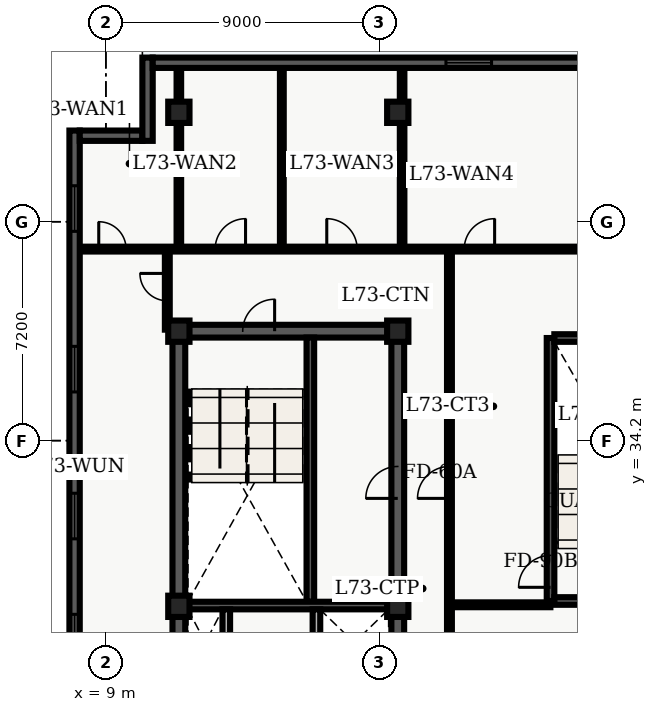
"""IFC4 building model, lengths in metres.
Left out: names, types, materials, properties, quantities, classifications, styles, units other than length and angle.
Written with IfcOpenShell. Run it as: python <this file> out.ifc"""

import sys

from ifc_helpers import new_model, entity, si_unit, converted_unit, direction, frame, origin_with_axes, origin_2d_with_axis, place, context, subcontext, project, spatial, polyline, rectangle, outline, extrude, element, fill, save


model = new_model("IFC4")
c1 = context("Model", 3, precision=1e-05, world=origin_with_axes(), true_north=direction((0.0, 1.0)))
c2 = subcontext(c1, "Body", "Model", "MODEL_VIEW")
j1 = project(units=[si_unit("LENGTHUNIT", "METRE"), converted_unit("PLANEANGLEUNIT", "DEGREE", entity("IfcPlaneAngleMeasure", 0.017), si_unit("PLANEANGLEUNIT", "RADIAN"), dimensions=[0, 0, 0, 0, 0, 0, 0])], contexts=[c1])
p1 = place(None, origin_with_axes())
s1 = spatial("IfcSite", under=j1, at=p1, CompositionType="ELEMENT")
p2 = place(p1, origin_with_axes())
s2 = spatial("IfcBuilding", under=s1, at=p2, CompositionType="ELEMENT")
p3 = place(p2, frame((0.0, 0.0, 295.8), z_axis=(0.0, 0.0, 1.0), x_axis=(1.0, 0.0, 0.0)))
s3 = spatial("IfcBuildingStorey", under=s2, at=p3, CompositionType="ELEMENT", Elevation=295.8)
p4 = place(p3, frame((11.4, 10.8, 0.0), z_axis=(0.0, 0.0, 1.0), x_axis=(0.0, 1.0, 0.0)))
e1 = element("IfcWall", 1, at=p4, inside=s3, PredefinedType="SHEAR", context=c2, shape_type="SweptSolid", body=[
    extrude(outline(polyline([(0.0, -0.21), (27.0, -0.21), (27.0, 0.21), (0.0, 0.21), (0.0, -0.21)])), origin_with_axes(), (0.0, 0.0, 1.0), 3.66),
])
p5 = place(p3, frame((11.4, 37.8, 0.0), z_axis=(0.0, 0.0, 1.0), x_axis=(1.0, 0.0, 0.0)))
e2 = element("IfcWall", 2, at=p5, inside=s3, PredefinedType="SHEAR", context=c2, shape_type="SweptSolid", body=[
    extrude(outline(polyline([(0.0, -0.21), (7.2, -0.21), (7.2, 0.21), (0.0, 0.21), (0.0, -0.21)])), origin_with_axes(), (0.0, 0.0, 1.0), 3.66),
])
p6 = place(p5, frame((2.625, 0.0, 0.0), z_axis=(0.0, 0.0, 1.0), x_axis=(1.0, 0.0, 0.0)))
e3 = element("IfcOpeningElement", 3, at=p6, cuts=e2, PredefinedType="OPENING", context=c2, shape_type="SweptSolid", body=[
    extrude(rectangle(XDim=1.05, YDim=0.44, at=origin_2d_with_axis()), origin_with_axes(), (0.0, 0.0, 1.0), 2.15),
])
p7 = place(p3, frame((18.6, 24.3, 0.0), z_axis=(0.0, 0.0, 1.0), x_axis=(0.0, 1.0, 0.0)))
e4 = element("IfcWall", 4, at=p7, inside=s3, PredefinedType="SHEAR", context=c2, shape_type="SweptSolid", body=[
    extrude(outline(polyline([(0.0, -0.21), (13.5, -0.21), (13.5, 0.21), (0.0, 0.21), (0.0, -0.21)])), origin_with_axes(), (0.0, 0.0, 1.0), 3.66),
])
p8 = place(p7, frame((8.525, 0.0, 0.0), z_axis=(0.0, 0.0, 1.0), x_axis=(1.0, 0.0, 0.0)))
e5 = element("IfcOpeningElement", 5, at=p8, cuts=e4, PredefinedType="OPENING", context=c2, shape_type="SweptSolid", body=[
    extrude(rectangle(XDim=1.05, YDim=0.44, at=origin_2d_with_axis()), origin_with_axes(), (0.0, 0.0, 1.0), 2.15),
])
p9 = place(p3, frame((15.725, 28.9, 0.0), z_axis=(0.0, 0.0, 1.0), x_axis=(0.0, 1.0, 0.0)))
e6 = element("IfcWall", 6, at=p9, inside=s3, PredefinedType="SHEAR", context=c2, shape_type="SweptSolid", body=[
    extrude(outline(polyline([(0.0, -0.125), (8.69, -0.125), (8.69, 0.125), (0.0, 0.125), (0.0, -0.125)])), origin_with_axes(), (0.0, 0.0, 1.0), 3.66),
])
p10 = place(p3, frame((11.61, 28.775, 0.0), z_axis=(0.0, 0.0, 1.0), x_axis=(1.0, 0.0, 0.0)))
e7 = element("IfcWall", 7, at=p10, inside=s3, PredefinedType="SHEAR", context=c2, shape_type="SweptSolid", body=[
    extrude(outline(polyline([(0.0, -0.125), (6.78, -0.125), (6.78, 0.125), (0.0, 0.125), (0.0, -0.125)])), origin_with_axes(), (0.0, 0.0, 1.0), 3.66),
])
for number, where, z_axis, x_axis in (
    (8, (12.96, 26.45, 0.0), (0.0, 0.0, 1.0), (0.0, 1.0, 0.0)),
    (9, (15.925, 26.45, 0.0), (0.0, 0.0, 1.0), (0.0, 1.0, 0.0)),
):
    element("IfcWall", number, at=place(p3, frame(where, z_axis=z_axis, x_axis=x_axis)), inside=s3, PredefinedType="SOLIDWALL", context=c2, shape_type="SweptSolid", body=[
        extrude(outline(polyline([(0.0, -0.125), (2.2, -0.125), (2.2, 0.125), (0.0, 0.125), (0.0, -0.125)])), origin_with_axes(), (0.0, 0.0, 1.0), 2.7),
    ])
p11 = place(p3, frame((23.625, 28.925, 0.0), z_axis=(0.0, 0.0, 1.0), x_axis=(0.0, 1.0, 0.0)))
e10 = element("IfcWall", 10, at=p11, inside=s3, PredefinedType="SHEAR", context=c2, shape_type="SweptSolid", body=[
    extrude(outline(polyline([(0.0, -0.125), (8.65, -0.125), (8.65, 0.125), (0.0, 0.125), (0.0, -0.125)])), origin_with_axes(), (0.0, 0.0, 1.0), 3.66),
])
p12 = place(p11, frame((0.975, 0.0, 0.0), z_axis=(0.0, 0.0, 1.0), x_axis=(1.0, 0.0, 0.0)))
e11 = element("IfcOpeningElement", 11, at=p12, cuts=e10, PredefinedType="OPENING", context=c2, shape_type="SweptSolid", body=[
    extrude(rectangle(XDim=1.05, YDim=0.27, at=origin_2d_with_axis()), origin_with_axes(), (0.0, 0.0, 1.0), 2.15),
])
for number, where, z_axis, x_axis in (
    (12, (23.75, 28.925, 0.0), (0.0, 0.0, 1.0), (1.0, 0.0, 0.0)),
    (13, (23.75, 37.575, 0.0), (0.0, 0.0, 1.0), (1.0, 0.0, 0.0)),
):
    element("IfcWall", number, at=place(p3, frame(where, z_axis=z_axis, x_axis=x_axis)), inside=s3, PredefinedType="SHEAR", context=c2, shape_type="SweptSolid", body=[
        extrude(outline(polyline([(0.0, -0.125), (3.9, -0.125), (3.9, 0.125), (0.0, 0.125), (0.0, -0.125)])), origin_with_axes(), (0.0, 0.0, 1.0), 3.66),
    ])
for number, where, z_axis, x_axis in (
    (14, (11.4, 28.75, 0.0), (0.0, 0.0, 1.0), (1.0, 0.0, 0.0)),
    (15, (11.4, 37.8, 0.0), (0.0, 0.0, 1.0), (1.0, 0.0, 0.0)),
    (16, (11.4, 45.0, 0.0), (0.0, 0.0, 1.0), (1.0, 0.0, 0.0)),
    (17, (18.6, 28.75, 0.0), (0.0, 0.0, 1.0), (1.0, 0.0, 0.0)),
    (18, (18.6, 37.8, 0.0), (0.0, 0.0, 1.0), (1.0, 0.0, 0.0)),
    (19, (18.6, 45.0, 0.0), (0.0, 0.0, 1.0), (1.0, 0.0, 0.0)),
):
    element("IfcColumn", number, at=place(p3, frame(where, z_axis=z_axis, x_axis=x_axis)), inside=s3, PredefinedType="COLUMN", context=c2, shape_type="SweptSolid", body=[
        extrude(rectangle(XDim=0.7, YDim=0.7, at=origin_2d_with_axis()), origin_with_axes(), (0.0, 0.0, 1.0), 3.9),
    ])
p13 = place(p3, frame((8.135, 40.5, 0.0), z_axis=(0.0, 0.0, 1.0), x_axis=(1.0, 0.0, 0.0)))
e20 = element("IfcWall", 20, at=p13, inside=s3, PredefinedType="PARTITIONING", context=c2, shape_type="SweptSolid", body=[
    extrude(outline(polyline([(0.0, -0.08), (22.715, -0.08), (22.715, 0.08), (0.0, 0.08), (0.0, -0.08)])), origin_with_axes(), (0.0, 0.0, 1.0), 2.7),
])
p14 = place(p13, frame((1.08, 0.0, 0.0), z_axis=(0.0, 0.0, 1.0), x_axis=(1.0, 0.0, 0.0)))
e21 = element("IfcOpeningElement", 21, at=p14, cuts=e20, PredefinedType="OPENING", context=c2, shape_type="SweptSolid", body=[
    extrude(rectangle(XDim=0.9, YDim=0.18, at=origin_2d_with_axis()), origin_with_axes(), (0.0, 0.0, 1.0), 2.15),
])
p15 = place(p13, frame((4.958, 0.0, 0.0), z_axis=(0.0, 0.0, 1.0), x_axis=(1.0, 0.0, 0.0)))
e22 = element("IfcOpeningElement", 22, at=p15, cuts=e20, PredefinedType="OPENING", context=c2, shape_type="SweptSolid", body=[
    extrude(rectangle(XDim=1.0, YDim=0.18, at=origin_2d_with_axis()), origin_with_axes(), (0.0, 0.0, 1.0), 2.15),
])
p16 = place(p13, frame((8.63, 0.0, 0.0), z_axis=(0.0, 0.0, 1.0), x_axis=(1.0, 0.0, 0.0)))
e23 = element("IfcOpeningElement", 23, at=p16, cuts=e20, PredefinedType="OPENING", context=c2, shape_type="SweptSolid", body=[
    extrude(rectangle(XDim=1.0, YDim=0.18, at=origin_2d_with_axis()), origin_with_axes(), (0.0, 0.0, 1.0), 2.15),
])
p17 = place(p13, frame((13.151, 0.0, 0.0), z_axis=(0.0, 0.0, 1.0), x_axis=(1.0, 0.0, 0.0)))
e24 = element("IfcOpeningElement", 24, at=p17, cuts=e20, PredefinedType="OPENING", context=c2, shape_type="SweptSolid", body=[
    extrude(rectangle(XDim=1.0, YDim=0.18, at=origin_2d_with_axis()), origin_with_axes(), (0.0, 0.0, 1.0), 2.15),
])
p18 = place(p3, frame((20.3, 2.14, 0.0), z_axis=(0.0, 0.0, 1.0), x_axis=(0.0, 1.0, 0.0)))
e25 = element("IfcWall", 25, at=p18, inside=s3, PredefinedType="PARTITIONING", context=c2, shape_type="SweptSolid", body=[
    extrude(outline(polyline([(0.0, -0.08), (38.36, -0.08), (38.36, 0.08), (0.0, 0.08), (0.0, -0.08)])), origin_with_axes(), (0.0, 0.0, 1.0), 2.7),
])
p19 = place(p18, frame((30.685, 0.0, 0.0), z_axis=(0.0, 0.0, 1.0), x_axis=(1.0, 0.0, 0.0)))
e26 = element("IfcOpeningElement", 26, at=p19, cuts=e25, PredefinedType="OPENING", context=c2, shape_type="SweptSolid", body=[
    extrude(rectangle(XDim=1.05, YDim=0.18, at=origin_2d_with_axis()), origin_with_axes(), (0.0, 0.0, 1.0), 2.15),
])
p20 = place(p18, frame((3.524, 0.0, 0.0), z_axis=(0.0, 0.0, 1.0), x_axis=(1.0, 0.0, 0.0)))
e27 = element("IfcOpeningElement", 27, at=p20, cuts=e25, PredefinedType="OPENING", context=c2, shape_type="SweptSolid", body=[
    extrude(rectangle(XDim=1.0, YDim=0.18, at=origin_2d_with_axis()), origin_with_axes(), (0.0, 0.0, 1.0), 2.15),
])
p21 = place(p18, frame((12.23, 0.0, 0.0), z_axis=(0.0, 0.0, 1.0), x_axis=(1.0, 0.0, 0.0)))
e28 = element("IfcOpeningElement", 28, at=p21, cuts=e25, PredefinedType="OPENING", context=c2, shape_type="SweptSolid", body=[
    extrude(rectangle(XDim=1.0, YDim=0.18, at=origin_2d_with_axis()), origin_with_axes(), (0.0, 0.0, 1.0), 2.15),
])
p22 = place(p18, frame((19.033, 0.0, 0.0), z_axis=(0.0, 0.0, 1.0), x_axis=(1.0, 0.0, 0.0)))
e29 = element("IfcOpeningElement", 29, at=p22, cuts=e25, PredefinedType="OPENING", context=c2, shape_type="SweptSolid", body=[
    extrude(rectangle(XDim=1.0, YDim=0.18, at=origin_2d_with_axis()), origin_with_axes(), (0.0, 0.0, 1.0), 2.15),
])
p23 = place(p18, frame((23.912, 0.0, 0.0), z_axis=(0.0, 0.0, 1.0), x_axis=(1.0, 0.0, 0.0)))
e30 = element("IfcOpeningElement", 30, at=p23, cuts=e25, PredefinedType="OPENING", context=c2, shape_type="SweptSolid", body=[
    extrude(rectangle(XDim=1.0, YDim=0.18, at=origin_2d_with_axis()), origin_with_axes(), (0.0, 0.0, 1.0), 2.15),
])
p24 = place(p3, frame((20.3, 28.8, 0.0), z_axis=(0.0, 0.0, 1.0), x_axis=(1.0, 0.0, 0.0)))
e31 = element("IfcWall", 31, at=p24, inside=s3, PredefinedType="PARTITIONING", context=c2, shape_type="SweptSolid", body=[
    extrude(outline(polyline([(0.0, -0.08), (3.32, -0.08), (3.32, 0.08), (0.0, 0.08), (0.0, -0.08)])), origin_with_axes(), (0.0, 0.0, 1.0), 2.7),
])
p25 = place(p3, frame((11.02, 37.85, 0.0), z_axis=(0.0, 0.0, 1.0), x_axis=(0.0, 1.0, 0.0)))
e32 = element("IfcWall", 32, at=p25, inside=s3, PredefinedType="PARTITIONING", context=c2, shape_type="SweptSolid", body=[
    extrude(outline(polyline([(0.0, -0.08), (2.65, -0.08), (2.65, 0.08), (0.0, 0.08), (0.0, -0.08)])), origin_with_axes(), (0.0, 0.0, 1.0), 2.7),
])
p26 = place(p25, frame((1.4, 0.0, 0.0), z_axis=(0.0, 0.0, 1.0), x_axis=(1.0, 0.0, 0.0)))
e33 = element("IfcOpeningElement", 33, at=p26, cuts=e32, PredefinedType="OPENING", context=c2, shape_type="SweptSolid", body=[
    extrude(rectangle(XDim=0.9, YDim=0.18, at=origin_2d_with_axis()), origin_with_axes(), (0.0, 0.0, 1.0), 2.15),
])
p27 = place(p3, frame((11.4, 40.6, 0.0), z_axis=(0.0, 0.0, 1.0), x_axis=(0.0, 1.0, 0.0)))
e34 = element("IfcWall", 34, at=p27, inside=s3, PredefinedType="PARTITIONING", context=c2, shape_type="SweptSolid", body=[
    extrude(outline(polyline([(0.0, -0.075), (5.865, -0.075), (5.865, 0.075), (0.0, 0.075), (0.0, -0.075)])), origin_with_axes(), (0.0, 0.0, 1.0), 2.7),
])
p28 = place(p3, frame((14.787, 40.6, 0.0), z_axis=(0.0, 0.0, 1.0), x_axis=(0.0, 1.0, 0.0)))
e35 = element("IfcWall", 35, at=p28, inside=s3, PredefinedType="PARTITIONING", context=c2, shape_type="SweptSolid", body=[
    extrude(outline(polyline([(0.0, -0.062), (5.865, -0.062), (5.865, 0.062), (0.0, 0.062), (0.0, -0.062)])), origin_with_axes(), (0.0, 0.0, 1.0), 2.7),
])
p29 = place(p3, frame((18.743, 40.6, 0.0), z_axis=(0.0, 0.0, 1.0), x_axis=(0.0, 1.0, 0.0)))
e36 = element("IfcWall", 36, at=p29, inside=s3, PredefinedType="PARTITIONING", context=c2, shape_type="SweptSolid", body=[
    extrude(outline(polyline([(0.0, -0.075), (5.865, -0.075), (5.865, 0.075), (0.0, 0.075), (0.0, -0.075)])), origin_with_axes(), (0.0, 0.0, 1.0), 2.7),
])
p30 = place(p3, frame((7.97, 4.54, 0.0), z_axis=(0.0, 0.0, 1.0), x_axis=(0.0, 1.0, 0.0)))
e37 = element("IfcWall", 37, at=p30, inside=s3, PredefinedType="SOLIDWALL", context=c2, shape_type="SweptSolid", body=[
    extrude(outline(polyline([(0.0, -0.17), (39.86, -0.17), (39.86, 0.17), (0.0, 0.17), (0.0, -0.17)])), origin_with_axes(), (0.0, 0.0, 1.0), 3.66),
])
p31 = place(p30, frame((7.849, 0.0, 0.45), z_axis=(0.0, 0.0, 1.0), x_axis=(1.0, 0.0, 0.0)))
e38 = element("IfcOpeningElement", 38, at=p31, cuts=e37, PredefinedType="OPENING", context=c2, shape_type="SweptSolid", body=[
    extrude(rectangle(XDim=1.5, YDim=0.36, at=origin_2d_with_axis()), origin_with_axes(), (0.0, 0.0, 1.0), 2.1),
])
p32 = place(p30, frame((12.681, 0.0, 0.45), z_axis=(0.0, 0.0, 1.0), x_axis=(1.0, 0.0, 0.0)))
e39 = element("IfcOpeningElement", 39, at=p32, cuts=e37, PredefinedType="OPENING", context=c2, shape_type="SweptSolid", body=[
    extrude(rectangle(XDim=1.5, YDim=0.36, at=origin_2d_with_axis()), origin_with_axes(), (0.0, 0.0, 1.0), 2.1),
])
p33 = place(p30, frame((17.514, 0.0, 0.45), z_axis=(0.0, 0.0, 1.0), x_axis=(1.0, 0.0, 0.0)))
e40 = element("IfcOpeningElement", 40, at=p33, cuts=e37, PredefinedType="OPENING", context=c2, shape_type="SweptSolid", body=[
    extrude(rectangle(XDim=1.5, YDim=0.36, at=origin_2d_with_axis()), origin_with_axes(), (0.0, 0.0, 1.0), 2.1),
])
p34 = place(p30, frame((23.196, 0.0, 0.45), z_axis=(0.0, 0.0, 1.0), x_axis=(1.0, 0.0, 0.0)))
e41 = element("IfcOpeningElement", 41, at=p34, cuts=e37, PredefinedType="OPENING", context=c2, shape_type="SweptSolid", body=[
    extrude(rectangle(XDim=1.5, YDim=0.36, at=origin_2d_with_axis()), origin_with_axes(), (0.0, 0.0, 1.0), 2.1),
])
p35 = place(p30, frame((27.179, 0.0, 0.45), z_axis=(0.0, 0.0, 1.0), x_axis=(1.0, 0.0, 0.0)))
e42 = element("IfcOpeningElement", 42, at=p35, cuts=e37, PredefinedType="OPENING", context=c2, shape_type="SweptSolid", body=[
    extrude(rectangle(XDim=1.5, YDim=0.36, at=origin_2d_with_axis()), origin_with_axes(), (0.0, 0.0, 1.0), 2.1),
])
p36 = place(p30, frame((32.011, 0.0, 0.45), z_axis=(0.0, 0.0, 1.0), x_axis=(1.0, 0.0, 0.0)))
e43 = element("IfcOpeningElement", 43, at=p36, cuts=e37, PredefinedType="OPENING", context=c2, shape_type="SweptSolid", body=[
    extrude(rectangle(XDim=1.5, YDim=0.36, at=origin_2d_with_axis()), origin_with_axes(), (0.0, 0.0, 1.0), 2.1),
])
p37 = place(p30, frame((37.294, 0.0, 0.45), z_axis=(0.0, 0.0, 1.0), x_axis=(1.0, 0.0, 0.0)))
e44 = element("IfcOpeningElement", 44, at=p37, cuts=e37, PredefinedType="OPENING", context=c2, shape_type="SweptSolid", body=[
    extrude(rectangle(XDim=1.5, YDim=0.36, at=origin_2d_with_axis()), origin_with_axes(), (0.0, 0.0, 1.0), 2.1),
])
p38 = place(p3, frame((8.14, 44.23, 0.0), z_axis=(0.0, 0.0, 1.0), x_axis=(1.0, 0.0, 0.0)))
e45 = element("IfcWall", 45, at=p38, inside=s3, PredefinedType="SOLIDWALL", context=c2, shape_type="SweptSolid", body=[
    extrude(outline(polyline([(0.0, -0.17), (2.06, -0.17), (2.06, 0.17), (0.0, 0.17), (0.0, -0.17)])), origin_with_axes(), (0.0, 0.0, 1.0), 3.66),
])
p39 = place(p3, frame((10.37, 44.06, 0.0), z_axis=(0.0, 0.0, 1.0), x_axis=(0.0, 1.0, 0.0)))
e46 = element("IfcWall", 46, at=p39, inside=s3, PredefinedType="SOLIDWALL", context=c2, shape_type="SweptSolid", body=[
    extrude(outline(polyline([(0.0, -0.17), (2.74, -0.17), (2.74, 0.17), (0.0, 0.17), (0.0, -0.17)])), origin_with_axes(), (0.0, 0.0, 1.0), 3.66),
])
p40 = place(p3, frame((10.54, 46.63, 0.0), z_axis=(0.0, 0.0, 1.0), x_axis=(1.0, 0.0, 0.0)))
e47 = element("IfcWall", 47, at=p40, inside=s3, PredefinedType="SOLIDWALL", context=c2, shape_type="SweptSolid", body=[
    extrude(outline(polyline([(0.0, -0.17), (14.26, -0.17), (14.26, 0.17), (0.0, 0.17), (0.0, -0.17)])), origin_with_axes(), (0.0, 0.0, 1.0), 3.66),
])
p41 = place(p40, frame((10.395, 0.0, 0.45), z_axis=(0.0, 0.0, 1.0), x_axis=(1.0, 0.0, 0.0)))
e48 = element("IfcOpeningElement", 48, at=p41, cuts=e47, PredefinedType="OPENING", context=c2, shape_type="SweptSolid", body=[
    extrude(rectangle(XDim=1.5, YDim=0.36, at=origin_2d_with_axis()), origin_with_axes(), (0.0, 0.0, 1.0), 2.1),
])
p42 = place(p5, frame((2.625, 0.0, 0.0), z_axis=(0.0, 0.0, 1.0), x_axis=(1.0, 0.0, 0.0)))
e49 = element("IfcDoor", 49, at=p42, inside=s3, OperationType="SINGLE_SWING_RIGHT", PredefinedType="DOOR", context=c2, shape_type="SweptSolid", body=[
    extrude(rectangle(XDim=1.05, YDim=0.09, at=origin_2d_with_axis()), origin_with_axes(), (0.0, 0.0, 1.0), 2.15),
])
fill(e3, e49)
p43 = place(p7, frame((8.525, 0.0, 0.0), z_axis=(0.0, 0.0, 1.0), x_axis=(1.0, 0.0, 0.0)))
e50 = element("IfcDoor", 50, at=p43, inside=s3, OperationType="SINGLE_SWING_LEFT", PredefinedType="DOOR", context=c2, shape_type="SweptSolid", body=[
    extrude(rectangle(XDim=1.05, YDim=0.09, at=origin_2d_with_axis()), origin_with_axes(), (0.0, 0.0, 1.0), 2.15),
])
fill(e5, e50)
p44 = place(p11, frame((0.975, 0.0, 0.0), z_axis=(0.0, 0.0, 1.0), x_axis=(1.0, 0.0, 0.0)))
e51 = element("IfcDoor", 51, at=p44, inside=s3, OperationType="SINGLE_SWING_LEFT", PredefinedType="DOOR", context=c2, shape_type="SweptSolid", body=[
    extrude(rectangle(XDim=1.05, YDim=0.09, at=origin_2d_with_axis()), origin_with_axes(), (0.0, 0.0, 1.0), 2.15),
])
fill(e11, e51)
p45 = place(p18, frame((30.685, 0.0, 0.0), z_axis=(0.0, 0.0, 1.0), x_axis=(1.0, 0.0, 0.0)))
e52 = element("IfcDoor", 52, at=p45, inside=s3, OperationType="SINGLE_SWING_LEFT", PredefinedType="DOOR", context=c2, shape_type="SweptSolid", body=[
    extrude(rectangle(XDim=1.05, YDim=0.09, at=origin_2d_with_axis()), origin_with_axes(), (0.0, 0.0, 1.0), 2.15),
])
fill(e26, e52)
p46 = place(p25, frame((1.4, 0.0, 0.0), z_axis=(0.0, 0.0, 1.0), x_axis=(1.0, 0.0, 0.0)))
e53 = element("IfcDoor", 53, at=p46, inside=s3, OperationType="SINGLE_SWING_RIGHT", PredefinedType="DOOR", context=c2, shape_type="SweptSolid", body=[
    extrude(rectangle(XDim=0.9, YDim=0.09, at=origin_2d_with_axis()), origin_with_axes(), (0.0, 0.0, 1.0), 2.15),
])
fill(e33, e53)
p47 = place(p13, frame((1.08, 0.0, 0.0), z_axis=(0.0, 0.0, 1.0), x_axis=(1.0, 0.0, 0.0)))
e54 = element("IfcDoor", 54, at=p47, inside=s3, OperationType="SINGLE_SWING_LEFT", PredefinedType="DOOR", context=c2, shape_type="SweptSolid", body=[
    extrude(rectangle(XDim=0.9, YDim=0.09, at=origin_2d_with_axis()), origin_with_axes(), (0.0, 0.0, 1.0), 2.15),
])
fill(e21, e54)
p48 = place(p13, frame((4.958, 0.0, 0.0), z_axis=(0.0, 0.0, 1.0), x_axis=(1.0, 0.0, 0.0)))
e55 = element("IfcDoor", 55, at=p48, inside=s3, OperationType="SINGLE_SWING_RIGHT", PredefinedType="DOOR", context=c2, shape_type="SweptSolid", body=[
    extrude(rectangle(XDim=1.0, YDim=0.09, at=origin_2d_with_axis()), origin_with_axes(), (0.0, 0.0, 1.0), 2.15),
])
fill(e22, e55)
p49 = place(p13, frame((8.63, 0.0, 0.0), z_axis=(0.0, 0.0, 1.0), x_axis=(1.0, 0.0, 0.0)))
e56 = element("IfcDoor", 56, at=p49, inside=s3, OperationType="SINGLE_SWING_LEFT", PredefinedType="DOOR", context=c2, shape_type="SweptSolid", body=[
    extrude(rectangle(XDim=1.0, YDim=0.09, at=origin_2d_with_axis()), origin_with_axes(), (0.0, 0.0, 1.0), 2.15),
])
fill(e23, e56)
p50 = place(p13, frame((13.151, 0.0, 0.0), z_axis=(0.0, 0.0, 1.0), x_axis=(1.0, 0.0, 0.0)))
e57 = element("IfcDoor", 57, at=p50, inside=s3, OperationType="SINGLE_SWING_RIGHT", PredefinedType="DOOR", context=c2, shape_type="SweptSolid", body=[
    extrude(rectangle(XDim=1.0, YDim=0.09, at=origin_2d_with_axis()), origin_with_axes(), (0.0, 0.0, 1.0), 2.15),
])
fill(e24, e57)
p51 = place(p30, frame((23.196, 0.0, 0.45), z_axis=(0.0, 0.0, 1.0), x_axis=(1.0, 0.0, 0.0)))
e58 = element("IfcWindow", 58, at=p51, inside=s3, PredefinedType="WINDOW", context=c2, shape_type="SweptSolid", body=[
    extrude(rectangle(XDim=1.5, YDim=0.09, at=origin_2d_with_axis()), origin_with_axes(), (0.0, 0.0, 1.0), 2.1),
])
fill(e41, e58)
p52 = place(p30, frame((27.179, 0.0, 0.45), z_axis=(0.0, 0.0, 1.0), x_axis=(1.0, 0.0, 0.0)))
e59 = element("IfcWindow", 59, at=p52, inside=s3, PredefinedType="WINDOW", context=c2, shape_type="SweptSolid", body=[
    extrude(rectangle(XDim=1.5, YDim=0.09, at=origin_2d_with_axis()), origin_with_axes(), (0.0, 0.0, 1.0), 2.1),
])
fill(e42, e59)
p53 = place(p30, frame((32.011, 0.0, 0.45), z_axis=(0.0, 0.0, 1.0), x_axis=(1.0, 0.0, 0.0)))
e60 = element("IfcWindow", 60, at=p53, inside=s3, PredefinedType="WINDOW", context=c2, shape_type="SweptSolid", body=[
    extrude(rectangle(XDim=1.5, YDim=0.09, at=origin_2d_with_axis()), origin_with_axes(), (0.0, 0.0, 1.0), 2.1),
])
fill(e43, e60)
p54 = place(p30, frame((37.294, 0.0, 0.45), z_axis=(0.0, 0.0, 1.0), x_axis=(1.0, 0.0, 0.0)))
e61 = element("IfcWindow", 61, at=p54, inside=s3, PredefinedType="WINDOW", context=c2, shape_type="SweptSolid", body=[
    extrude(rectangle(XDim=1.5, YDim=0.09, at=origin_2d_with_axis()), origin_with_axes(), (0.0, 0.0, 1.0), 2.1),
])
fill(e44, e61)
p55 = place(p40, frame((10.395, 0.0, 0.45), z_axis=(0.0, 0.0, 1.0), x_axis=(1.0, 0.0, 0.0)))
e62 = element("IfcWindow", 62, at=p55, inside=s3, PredefinedType="WINDOW", context=c2, shape_type="SweptSolid", body=[
    extrude(rectangle(XDim=1.5, YDim=0.09, at=origin_2d_with_axis()), origin_with_axes(), (0.0, 0.0, 1.0), 2.1),
])
fill(e48, e62)
save(model, sys.argv[1])
